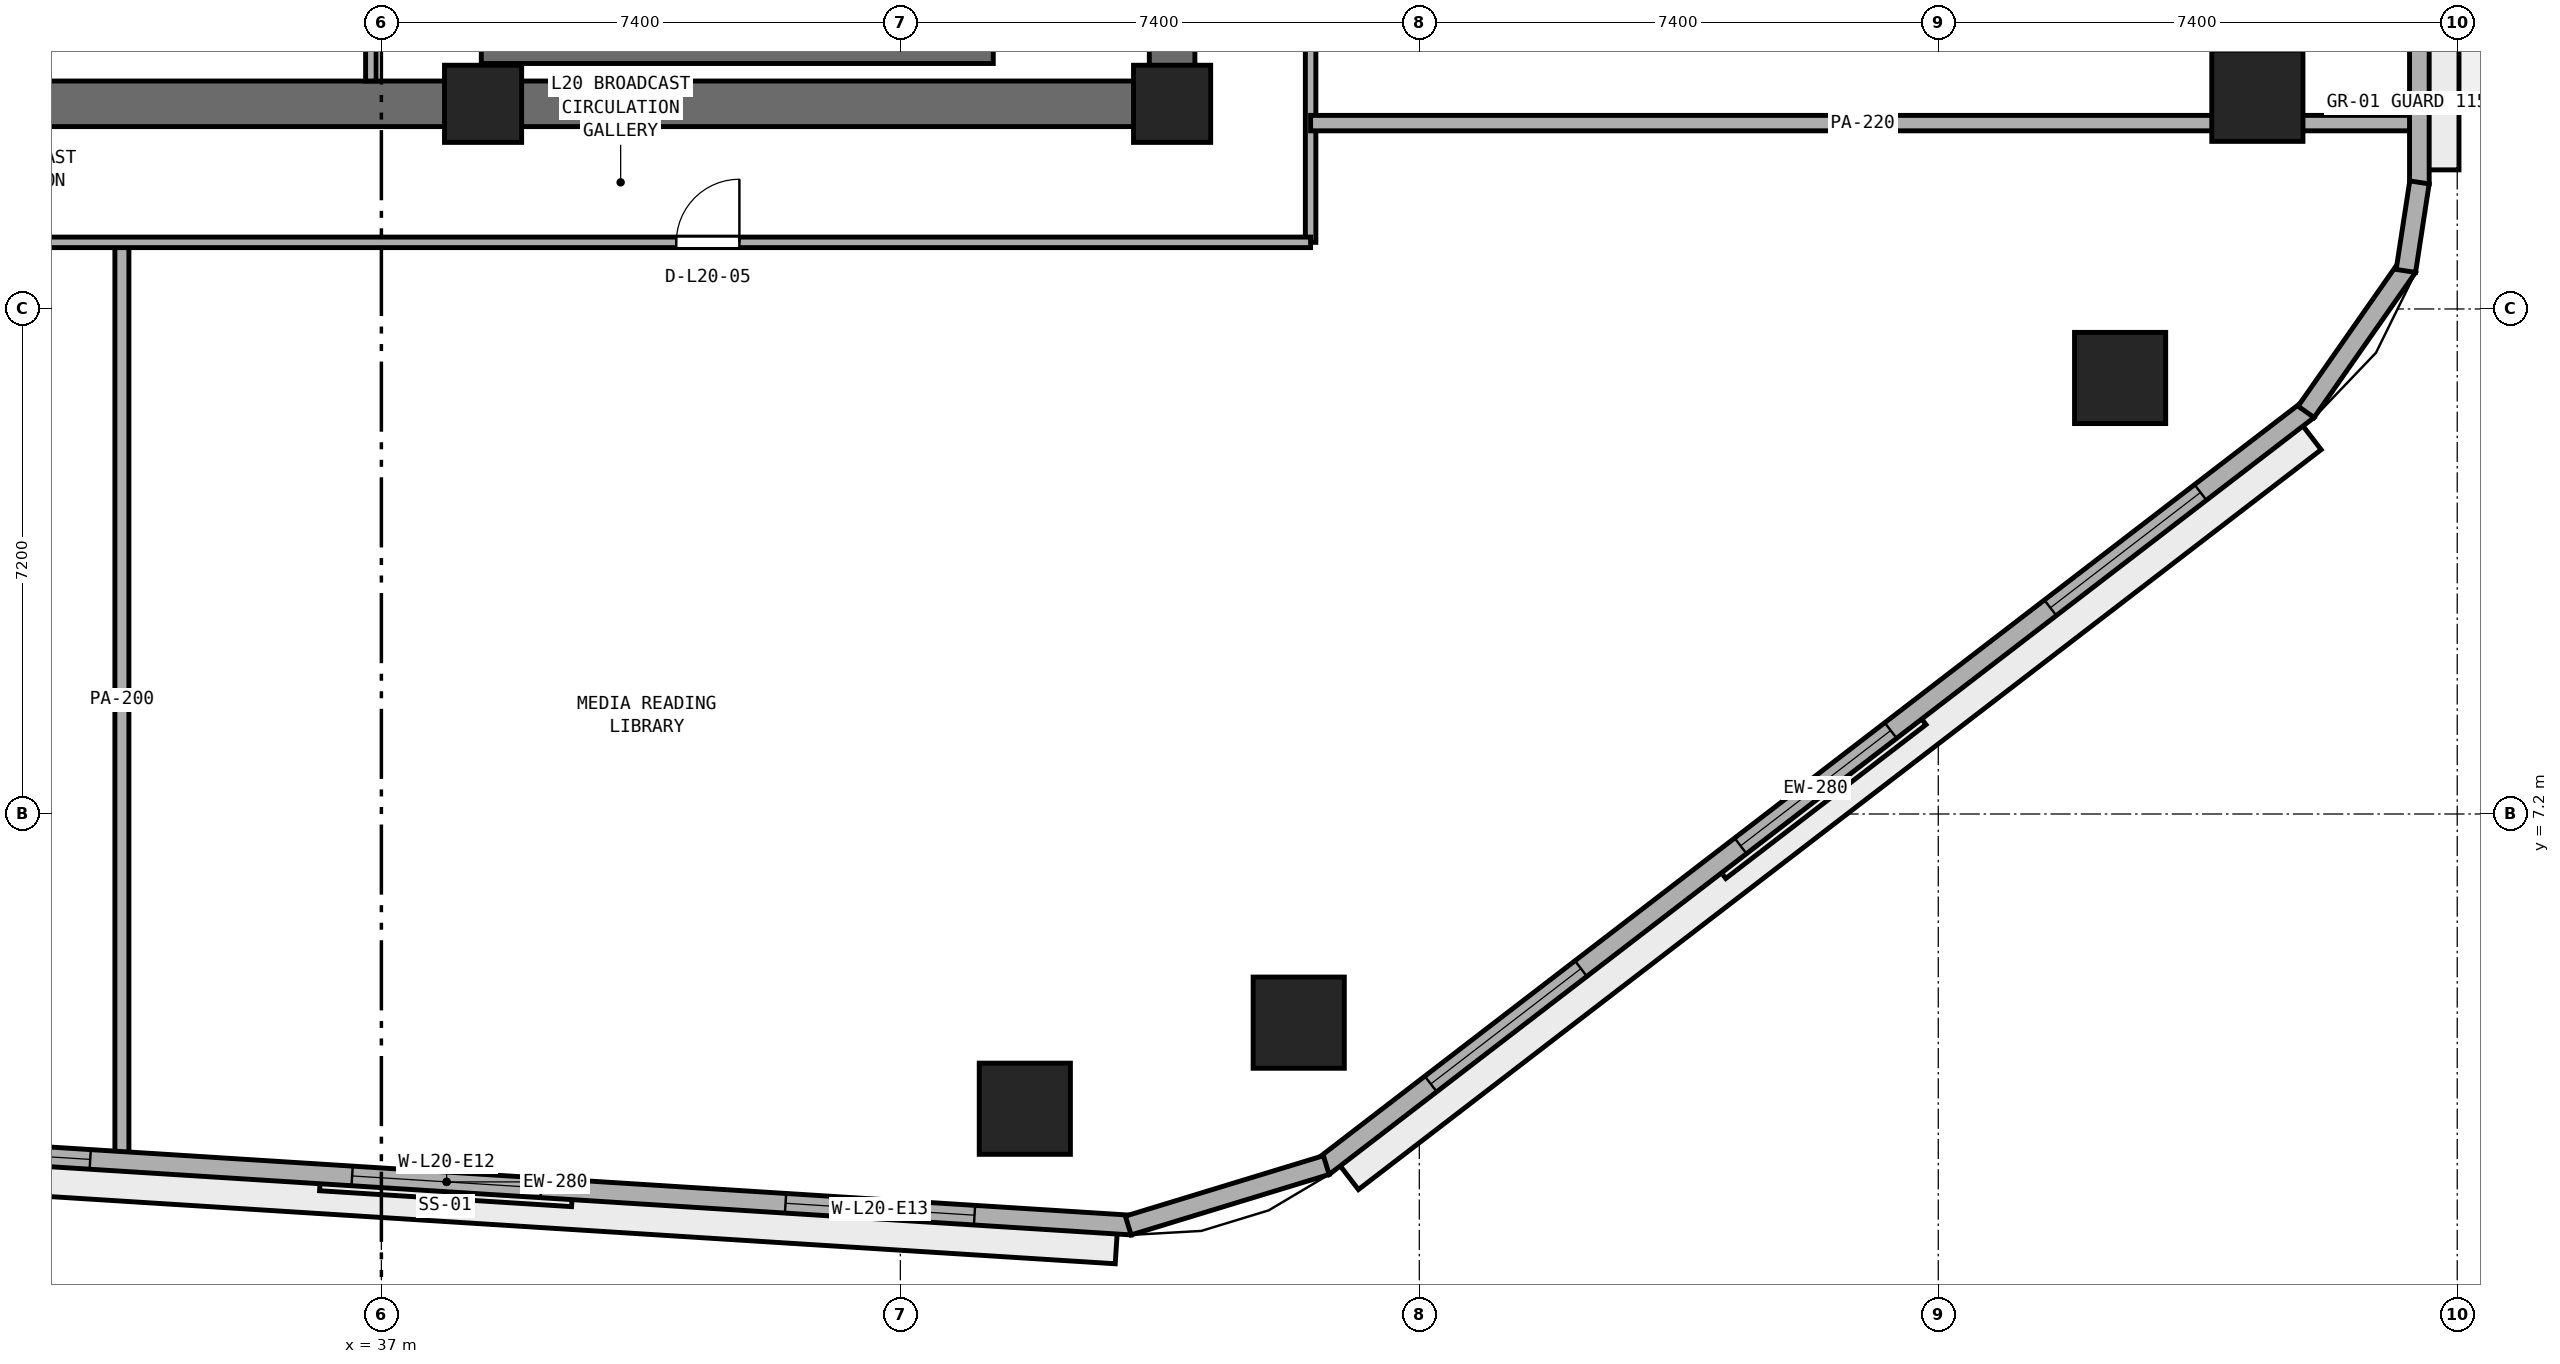
"""IFC4 building model, lengths in metres.
Left out: names, types, materials, properties, quantities, classifications, styles, units other than length and angle.
Written with IfcOpenShell. Run it as: python <this file> out.ifc"""

import sys

from ifc_helpers import new_model, si_unit, direction, frame, frame_2d, origin, origin_2d, place, context, subcontext, project, spatial, rectangle, extrude, element, fill, save


model = new_model("IFC4")
c1 = context("Model", 3, precision=1e-05, world=origin(), true_north=direction((0.0, 1.0)))
c2 = subcontext(c1, "Body", "Model", "MODEL_VIEW")
j1 = project(units=[si_unit("LENGTHUNIT", "METRE"), si_unit("PLANEANGLEUNIT", "RADIAN")], contexts=[c1])
p1 = place(None, origin())
s1 = spatial("IfcSite", under=j1, at=p1, CompositionType="ELEMENT")
p2 = place(p1, origin())
s2 = spatial("IfcBuilding", under=s1, at=p2, CompositionType="ELEMENT")
p3 = place(p2, frame((0.0, 0.0, 82.0)))
s3 = spatial("IfcBuildingStorey", under=s2, at=p3, CompositionType="ELEMENT", Elevation=82.0)
p4 = place(p3, frame((25.4, 17.325, 0.0), z_axis=(0.0, 0.0, 1.0), x_axis=(1.0, 0.0, 0.0)))
e1 = element("IfcWall", 1, at=p4, inside=s3, PredefinedType="SHEAR", context=c2, shape_type="SweptSolid", body=[
    extrude(rectangle(XDim=23.2, YDim=0.65, at=frame_2d((11.6, 0.0))), origin(), (0.0, 0.0, 1.0), 3.525),
])
p5 = place(p3, frame((48.275, 17.65, 0.0), z_axis=(0.0, 0.0, 1.0), x_axis=(0.0, 1.0, 0.0)))
e2 = element("IfcWall", 2, at=p5, inside=s3, PredefinedType="SHEAR", context=c2, shape_type="SweptSolid", body=[
    extrude(rectangle(XDim=15.1, YDim=0.65, at=frame_2d((7.55, 0.0))), origin(), (0.0, 0.0, 1.0), 3.525),
])
p6 = place(p5, frame((5.65, 0.0, 0.0)))
e3 = element("IfcOpeningElement", 3, at=p6, cuts=e2, PredefinedType="OPENING", context=c2, shape_type="SweptSolid", body=[
    extrude(rectangle(XDim=1.5, YDim=2.15, at=frame_2d((0.75, 1.075))), frame((0.0, 0.335, 0.0), z_axis=(0.0, -1.0, 0.0), x_axis=(1.0, 0.0, 0.0)), (0.0, 0.0, 1.0), 0.67),
])
for number, where, z_axis, x_axis in (
    (4, (38.45, 17.325, 0.0), (0.0, 0.0, 1.0), (1.0, 0.0, 0.0)),
    (5, (48.275, 17.325, 0.0), (0.0, 0.0, 1.0), (1.0, 0.0, 0.0)),
):
    element("IfcColumn", number, at=place(p3, frame(where, z_axis=z_axis, x_axis=x_axis)), inside=s3, PredefinedType="PILASTER", context=c2, shape_type="SweptSolid", body=[
        extrude(rectangle(XDim=1.1, YDim=1.1, at=origin_2d()), origin(), (0.0, 0.0, 1.0), 3.8),
    ])
for number, where, z_axis, x_axis in (
    (6, (46.175, 2.998, 0.0), (0.0, 0.0, 1.0), (1.0, 0.0, 0.0)),
    (7, (50.081, 4.225, 0.0), (0.0, 0.0, 1.0), (1.0, 0.0, 0.0)),
    (8, (61.793, 13.416, 0.0), (0.0, 0.0, 1.0), (1.0, 0.0, 0.0)),
    (9, (63.75, 17.44, 0.0), (0.0, 0.0, 1.0), (1.0, 0.0, 0.0)),
):
    element("IfcColumn", number, at=place(p3, frame(where, z_axis=z_axis, x_axis=x_axis)), inside=s3, PredefinedType="COLUMN", context=c2, shape_type="SweptSolid", body=[
        extrude(rectangle(XDim=1.3, YDim=1.3, at=origin_2d()), origin(), (0.0, 0.0, 1.0), 3.8),
    ])
p7 = place(p3, frame((38.425, 18.025, 0.0), z_axis=(0.0, 0.0, 1.0), x_axis=(1.0, 0.0, 0.0)))
e10 = element("IfcWall", 10, at=p7, inside=s3, PredefinedType="SHEAR", context=c2, shape_type="SweptSolid", body=[
    extrude(rectangle(XDim=7.3, YDim=0.25, at=frame_2d((3.65, 0.0))), origin(), (0.0, 0.0, 1.0), 3.525),
])
p8 = place(p3, frame((36.85, 17.65, 0.0), z_axis=(0.0, 0.0, 1.0), x_axis=(0.0, 1.0, 0.0)))
e11 = element("IfcWall", 11, at=p8, inside=s3, PredefinedType="PARTITIONING", context=c2, shape_type="SweptSolid", body=[
    extrude(rectangle(XDim=2.1, YDim=0.15, at=frame_2d((1.05, 0.0))), origin(), (0.0, 0.0, 1.0), 3.525),
])
p9 = place(p3, frame((50.25, 15.35, 0.0), z_axis=(0.0, 0.0, 1.0), x_axis=(0.0, 1.0, 0.0)))
e12 = element("IfcWall", 12, at=p9, inside=s3, PredefinedType="PARTITIONING", context=c2, shape_type="SweptSolid", body=[
    extrude(rectangle(XDim=19.7, YDim=0.15, at=frame_2d((9.85, 0.0))), origin(), (0.0, 0.0, 1.0), 3.525),
])
p10 = place(p9, frame((9.4, 0.0, 0.0)))
e13 = element("IfcOpeningElement", 13, at=p10, cuts=e12, PredefinedType="OPENING", context=c2, shape_type="SweptSolid", body=[
    extrude(rectangle(XDim=0.9, YDim=2.1, at=frame_2d((0.45, 1.05))), frame((0.0, 0.085, 0.0), z_axis=(0.0, -1.0, 0.0), x_axis=(1.0, 0.0, 0.0)), (0.0, 0.0, 1.0), 0.17),
])
p11 = place(p3, frame((33.3, 2.312, 0.0), z_axis=(0.0, 0.0, 1.0), x_axis=(0.0, 1.0, 0.0)))
e14 = element("IfcWall", 14, at=p11, inside=s3, PredefinedType="PARTITIONING", context=c2, shape_type="SweptSolid", body=[
    extrude(rectangle(XDim=13.038, YDim=0.2, at=frame_2d((6.519, 0.0))), origin(), (0.0, 0.0, 1.0), 3.525),
])
p12 = place(p3, frame((23.75, 15.35, 0.0), z_axis=(0.0, 0.0, 1.0), x_axis=(1.0, 0.0, 0.0)))
e15 = element("IfcWall", 15, at=p12, inside=s3, PredefinedType="PARTITIONING", context=c2, shape_type="SweptSolid", body=[
    extrude(rectangle(XDim=26.5, YDim=0.15, at=frame_2d((13.25, 0.0))), origin(), (0.0, 0.0, 1.0), 3.525),
])
p13 = place(p12, frame((4.445, 0.0, 0.0)))
e16 = element("IfcOpeningElement", 16, at=p13, cuts=e15, PredefinedType="OPENING", context=c2, shape_type="SweptSolid", body=[
    extrude(rectangle(XDim=0.9, YDim=2.1, at=frame_2d((0.45, 1.05))), frame((0.0, 0.085, 0.0), z_axis=(0.0, -1.0, 0.0), x_axis=(1.0, 0.0, 0.0)), (0.0, 0.0, 1.0), 0.17),
])
p14 = place(p12, frame((17.455, 0.0, 0.0)))
e17 = element("IfcOpeningElement", 17, at=p14, cuts=e15, PredefinedType="OPENING", context=c2, shape_type="SweptSolid", body=[
    extrude(rectangle(XDim=0.9, YDim=2.1, at=frame_2d((0.45, 1.05))), frame((0.0, 0.085, 0.0), z_axis=(0.0, -1.0, 0.0), x_axis=(1.0, 0.0, 0.0)), (0.0, 0.0, 1.0), 0.17),
])
p15 = place(p3, frame((50.25, 17.05, 0.0), z_axis=(0.0, 0.0, 1.0), x_axis=(1.0, 0.0, 0.0)))
e18 = element("IfcWall", 18, at=p15, inside=s3, PredefinedType="PARTITIONING", context=c2, shape_type="SweptSolid", body=[
    extrude(rectangle(XDim=15.745, YDim=0.22, at=frame_2d((7.873, 0.0))), origin(), (0.0, 0.0, 1.0), 3.525),
])
p16 = place(p3, frame((28.161, 2.571, 0.0), z_axis=(0.0, 0.0, 1.0), x_axis=(0.998017288298, -0.06294038654, 0.0)))
e19 = element("IfcWall", 19, at=p16, inside=s3, PredefinedType="STANDARD", context=c2, shape_type="SweptSolid", body=[
    extrude(rectangle(XDim=19.577, YDim=0.28, at=frame_2d((9.789, 0.0))), origin(), (0.0, 0.0, 1.0), 3.525),
])
p17 = place(p16, frame((1.996, 0.0, 0.9)))
e20 = element("IfcOpeningElement", 20, at=p17, cuts=e19, PredefinedType="OPENING", context=c2, shape_type="SweptSolid", body=[
    extrude(rectangle(XDim=2.7, YDim=1.75, at=frame_2d((1.35, 0.875))), frame((0.0, 0.15, 0.0), z_axis=(0.0, -1.0, 0.0), x_axis=(1.0, 0.0, 0.0)), (0.0, 0.0, 1.0), 0.3),
])
p18 = place(p16, frame((8.438, 0.0, 0.9)))
e21 = element("IfcOpeningElement", 21, at=p18, cuts=e19, PredefinedType="OPENING", context=c2, shape_type="SweptSolid", body=[
    extrude(rectangle(XDim=2.7, YDim=1.75, at=frame_2d((1.35, 0.875))), frame((0.0, 0.15, 0.0), z_axis=(0.0, -1.0, 0.0), x_axis=(1.0, 0.0, 0.0)), (0.0, 0.0, 1.0), 0.3),
])
p19 = place(p16, frame((14.631, 0.0, 0.9)))
e22 = element("IfcOpeningElement", 22, at=p19, cuts=e19, PredefinedType="OPENING", context=c2, shape_type="SweptSolid", body=[
    extrude(rectangle(XDim=2.7, YDim=1.75, at=frame_2d((1.35, 0.875))), frame((0.0, 0.15, 0.0), z_axis=(0.0, -1.0, 0.0), x_axis=(1.0, 0.0, 0.0)), (0.0, 0.0, 1.0), 0.3),
])
p20 = place(p3, frame((50.429, 2.172, 0.0), z_axis=(0.0, 0.0, 1.0), x_axis=(0.792937466367, 0.609303023488, 0.0)))
e23 = element("IfcWall", 23, at=p20, inside=s3, PredefinedType="STANDARD", context=c2, shape_type="SweptSolid", body=[
    extrude(rectangle(XDim=17.713, YDim=0.28, at=frame_2d((8.856, 0.0))), origin(), (0.0, 0.0, 1.0), 3.525),
])
p21 = place(p20, frame((1.936, 0.0, 0.9)))
e24 = element("IfcOpeningElement", 24, at=p21, cuts=e23, PredefinedType="OPENING", context=c2, shape_type="SweptSolid", body=[
    extrude(rectangle(XDim=2.7, YDim=1.75, at=frame_2d((1.35, 0.875))), frame((0.0, 0.15, 0.0), z_axis=(0.0, -1.0, 0.0), x_axis=(1.0, 0.0, 0.0)), (0.0, 0.0, 1.0), 0.3),
])
p22 = place(p20, frame((7.506, 0.0, 0.9)))
e25 = element("IfcOpeningElement", 25, at=p22, cuts=e23, PredefinedType="OPENING", context=c2, shape_type="SweptSolid", body=[
    extrude(rectangle(XDim=2.7, YDim=1.75, at=frame_2d((1.35, 0.875))), frame((0.0, 0.15, 0.0), z_axis=(0.0, -1.0, 0.0), x_axis=(1.0, 0.0, 0.0)), (0.0, 0.0, 1.0), 0.3),
])
p23 = place(p20, frame((13.077, 0.0, 0.9)))
e26 = element("IfcOpeningElement", 26, at=p23, cuts=e23, PredefinedType="OPENING", context=c2, shape_type="SweptSolid", body=[
    extrude(rectangle(XDim=2.7, YDim=1.75, at=frame_2d((1.35, 0.875))), frame((0.0, 0.15, 0.0), z_axis=(0.0, -1.0, 0.0), x_axis=(1.0, 0.0, 0.0)), (0.0, 0.0, 1.0), 0.3),
])
p24 = place(p3, frame((66.06, 16.183, 0.0), z_axis=(0.0, 0.0, 1.0), x_axis=(0.0, 1.0, 0.0)))
e27 = element("IfcWall", 27, at=p24, inside=s3, PredefinedType="STANDARD", context=c2, shape_type="SweptSolid", body=[
    extrude(rectangle(XDim=19.331, YDim=0.28, at=frame_2d((9.666, 0.0))), origin(), (0.0, 0.0, 1.0), 3.525),
])
p25 = place(p24, frame((9.115, 0.0, 0.0)))
e28 = element("IfcOpeningElement", 28, at=p25, cuts=e27, PredefinedType="OPENING", context=c2, shape_type="SweptSolid", body=[
    extrude(rectangle(XDim=1.1, YDim=2.2, at=frame_2d((0.55, 1.1))), frame((0.0, 0.15, 0.0), z_axis=(0.0, -1.0, 0.0), x_axis=(1.0, 0.0, 0.0)), (0.0, 0.0, 1.0), 0.3),
])
p26 = place(p24, frame((2.205, 0.0, 0.9)))
e29 = element("IfcOpeningElement", 29, at=p26, cuts=e27, PredefinedType="OPENING", context=c2, shape_type="SweptSolid", body=[
    extrude(rectangle(XDim=2.7, YDim=1.75, at=frame_2d((1.35, 0.875))), frame((0.0, 0.15, 0.0), z_axis=(0.0, -1.0, 0.0), x_axis=(1.0, 0.0, 0.0)), (0.0, 0.0, 1.0), 0.3),
])
p27 = place(p24, frame((14.176, 0.0, 0.9)))
e30 = element("IfcOpeningElement", 30, at=p27, cuts=e27, PredefinedType="OPENING", context=c2, shape_type="SweptSolid", body=[
    extrude(rectangle(XDim=2.7, YDim=1.75, at=frame_2d((1.35, 0.875))), frame((0.0, 0.15, 0.0), z_axis=(0.0, -1.0, 0.0), x_axis=(1.0, 0.0, 0.0)), (0.0, 0.0, 1.0), 0.3),
])
p28 = place(p3, frame((47.65, 1.333, 0.0), z_axis=(0.0, 0.0, 1.0), x_axis=(0.956461287977, 0.291859220516, 0.0)))
e31 = element("IfcWall", 31, at=p28, inside=s3, PredefinedType="STANDARD", context=c2, shape_type="SweptSolid", body=[
    extrude(rectangle(XDim=2.952, YDim=0.28, at=frame_2d((1.476, 0.0))), origin(), (0.0, 0.0, 1.0), 3.525),
])
p29 = place(p3, frame((64.444, 12.933, 0.0), z_axis=(0.0, 0.0, 1.0), x_axis=(0.573176686443, 0.819431806875, 0.0)))
e32 = element("IfcWall", 32, at=p29, inside=s3, PredefinedType="STANDARD", context=c2, shape_type="SweptSolid", body=[
    extrude(rectangle(XDim=2.524, YDim=0.28, at=frame_2d((1.262, 0.0))), origin(), (0.0, 0.0, 1.0), 3.525),
])
p30 = place(p3, frame((65.867, 14.943, 0.0), z_axis=(0.0, 0.0, 1.0), x_axis=(0.152014078361, 0.988378328364, 0.0)))
e33 = element("IfcWall", 33, at=p30, inside=s3, PredefinedType="STANDARD", context=c2, shape_type="SweptSolid", body=[
    extrude(rectangle(XDim=1.277, YDim=0.28, at=frame_2d((0.638, 0.0))), origin(), (0.0, 0.0, 1.0), 3.525),
])
p31 = place(p14, origin())
e34 = element("IfcDoor", 34, at=p31, inside=s3, OperationType="SINGLE_SWING_RIGHT", PredefinedType="DOOR", context=c2, shape_type="SweptSolid", body=[
    extrude(rectangle(XDim=0.9, YDim=2.1, at=frame_2d((0.45, 1.05))), frame((0.0, 0.025, 0.0), z_axis=(0.0, -1.0, 0.0), x_axis=(1.0, 0.0, 0.0)), (0.0, 0.0, 1.0), 0.05),
])
fill(e17, e34)
p32 = place(p17, origin())
e35 = element("IfcWindow", 35, at=p32, inside=s3, PartitioningType="SINGLE_PANEL", PredefinedType="WINDOW", context=c2, shape_type="SweptSolid", body=[
    extrude(rectangle(XDim=2.7, YDim=1.75, at=frame_2d((1.35, 0.875))), frame((0.0, 0.03, 0.0), z_axis=(0.0, -1.0, 0.0), x_axis=(1.0, 0.0, 0.0)), (0.0, 0.0, 1.0), 0.06),
])
fill(e20, e35)
p33 = place(p18, origin())
e36 = element("IfcWindow", 36, at=p33, inside=s3, PartitioningType="SINGLE_PANEL", PredefinedType="WINDOW", context=c2, shape_type="SweptSolid", body=[
    extrude(rectangle(XDim=2.7, YDim=1.75, at=frame_2d((1.35, 0.875))), frame((0.0, 0.03, 0.0), z_axis=(0.0, -1.0, 0.0), x_axis=(1.0, 0.0, 0.0)), (0.0, 0.0, 1.0), 0.06),
])
fill(e21, e36)
p34 = place(p19, origin())
e37 = element("IfcWindow", 37, at=p34, inside=s3, PartitioningType="SINGLE_PANEL", PredefinedType="WINDOW", context=c2, shape_type="SweptSolid", body=[
    extrude(rectangle(XDim=2.7, YDim=1.75, at=frame_2d((1.35, 0.875))), frame((0.0, 0.03, 0.0), z_axis=(0.0, -1.0, 0.0), x_axis=(1.0, 0.0, 0.0)), (0.0, 0.0, 1.0), 0.06),
])
fill(e22, e37)
p35 = place(p21, origin())
e38 = element("IfcWindow", 38, at=p35, inside=s3, PartitioningType="SINGLE_PANEL", PredefinedType="WINDOW", context=c2, shape_type="SweptSolid", body=[
    extrude(rectangle(XDim=2.7, YDim=1.75, at=frame_2d((1.35, 0.875))), frame((0.0, 0.03, 0.0), z_axis=(0.0, -1.0, 0.0), x_axis=(1.0, 0.0, 0.0)), (0.0, 0.0, 1.0), 0.06),
])
fill(e24, e38)
p36 = place(p22, origin())
e39 = element("IfcWindow", 39, at=p36, inside=s3, PartitioningType="SINGLE_PANEL", PredefinedType="WINDOW", context=c2, shape_type="SweptSolid", body=[
    extrude(rectangle(XDim=2.7, YDim=1.75, at=frame_2d((1.35, 0.875))), frame((0.0, 0.03, 0.0), z_axis=(0.0, -1.0, 0.0), x_axis=(1.0, 0.0, 0.0)), (0.0, 0.0, 1.0), 0.06),
])
fill(e25, e39)
p37 = place(p23, origin())
e40 = element("IfcWindow", 40, at=p37, inside=s3, PartitioningType="SINGLE_PANEL", PredefinedType="WINDOW", context=c2, shape_type="SweptSolid", body=[
    extrude(rectangle(XDim=2.7, YDim=1.75, at=frame_2d((1.35, 0.875))), frame((0.0, 0.03, 0.0), z_axis=(0.0, -1.0, 0.0), x_axis=(1.0, 0.0, 0.0)), (0.0, 0.0, 1.0), 0.06),
])
fill(e26, e40)
save(model, sys.argv[1])
